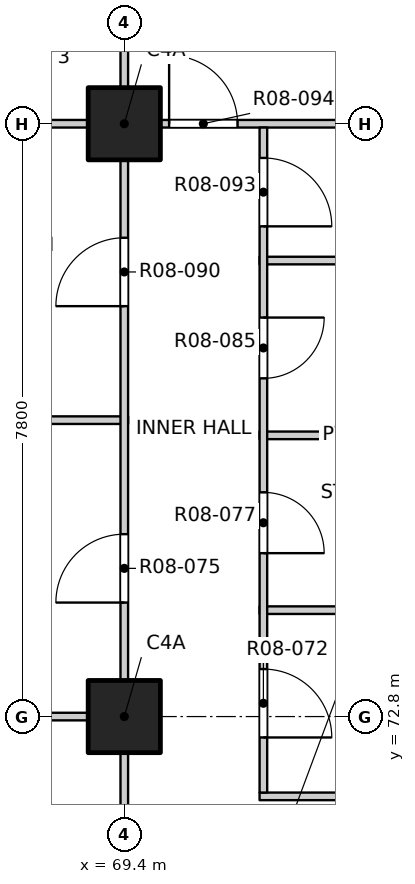
"""IFC4 building model, lengths in metres.
Left out: names, types, materials, properties, quantities, classifications, styles, units other than length and angle.
Written with IfcOpenShell. Run it as: python <this file> out.ifc"""

import sys

from ifc_helpers import new_model, si_unit, direction, frame, frame_2d, origin, origin_2d, place, context, subcontext, project, spatial, rectangle, extrude, element, fill, save


model = new_model("IFC4")
c1 = context("Model", 3, precision=1e-05, world=origin(), true_north=direction((0.0, 1.0)))
c2 = subcontext(c1, "Body", "Model", "MODEL_VIEW")
j1 = project(units=[si_unit("LENGTHUNIT", "METRE"), si_unit("PLANEANGLEUNIT", "RADIAN")], contexts=[c1])
p1 = place(None, origin())
s1 = spatial("IfcSite", under=j1, at=p1, CompositionType="ELEMENT")
p2 = place(p1, origin())
s2 = spatial("IfcBuilding", under=s1, at=p2, CompositionType="ELEMENT")
p3 = place(p2, frame((0.0, 0.0, 103.3)))
s3 = spatial("IfcBuildingStorey", under=s2, at=p3, CompositionType="ELEMENT", Elevation=103.3)
for number, where, z_axis, x_axis in (
    (1, (69.4, 72.8, -0.25), (0.0, 0.0, 1.0), (1.0, 0.0, 0.0)),
    (2, (69.4, 80.6, -0.25), (0.0, 0.0, 1.0), (1.0, 0.0, 0.0)),
):
    element("IfcColumn", number, at=place(p3, frame(where, z_axis=z_axis, x_axis=x_axis)), inside=s3, PredefinedType="COLUMN", context=c2, shape_type="SweptSolid", body=[
        extrude(rectangle(XDim=0.95, YDim=0.95, at=origin_2d()), origin(), (0.0, 0.0, 1.0), 3.4),
    ])
p4 = place(p3, frame((71.18, 71.75, 0.0), z_axis=(0.0, 0.0, 1.0), x_axis=(1.0, 0.0, 0.0)))
e3 = element("IfcWall", 3, at=p4, inside=s3, PredefinedType="PARTITIONING", context=c2, shape_type="SweptSolid", body=[
    extrude(rectangle(XDim=2.22, YDim=0.1, at=frame_2d((1.11, 0.0))), origin(), (0.0, 0.0, 1.0), 3.15),
])
p5 = place(p3, frame((65.8, 72.8, 0.0), z_axis=(0.0, 0.0, 1.0), x_axis=(1.0, 0.0, 0.0)))
e4 = element("IfcWall", 4, at=p5, inside=s3, PredefinedType="PARTITIONING", context=c2, shape_type="SweptSolid", body=[
    extrude(rectangle(XDim=3.65, YDim=0.1, at=frame_2d((1.825, 0.0))), origin(), (0.0, 0.0, 1.0), 3.15),
])
p6 = place(p3, frame((71.18, 74.2, 0.0), z_axis=(0.0, 0.0, 1.0), x_axis=(1.0, 0.0, 0.0)))
e5 = element("IfcWall", 5, at=p6, inside=s3, PredefinedType="PARTITIONING", context=c2, shape_type="SweptSolid", body=[
    extrude(rectangle(XDim=2.22, YDim=0.1, at=frame_2d((1.11, 0.0))), origin(), (0.0, 0.0, 1.0), 3.15),
])
p7 = place(p3, frame((71.18, 76.5, 0.0), z_axis=(0.0, 0.0, 1.0), x_axis=(1.0, 0.0, 0.0)))
e6 = element("IfcWall", 6, at=p7, inside=s3, PredefinedType="PARTITIONING", context=c2, shape_type="SweptSolid", body=[
    extrude(rectangle(XDim=2.22, YDim=0.1, at=frame_2d((1.11, 0.0))), origin(), (0.0, 0.0, 1.0), 2.55),
])
p8 = place(p3, frame((65.8, 76.7, 0.0), z_axis=(0.0, 0.0, 1.0), x_axis=(1.0, 0.0, 0.0)))
e7 = element("IfcWall", 7, at=p8, inside=s3, PredefinedType="PARTITIONING", context=c2, shape_type="SweptSolid", body=[
    extrude(rectangle(XDim=3.65, YDim=0.1, at=frame_2d((1.825, 0.0))), origin(), (0.0, 0.0, 1.0), 2.55),
])
p9 = place(p3, frame((71.18, 78.8, 0.0), z_axis=(0.0, 0.0, 1.0), x_axis=(1.0, 0.0, 0.0)))
e8 = element("IfcWall", 8, at=p9, inside=s3, PredefinedType="PARTITIONING", context=c2, shape_type="SweptSolid", body=[
    extrude(rectangle(XDim=2.22, YDim=0.1, at=frame_2d((1.11, 0.0))), origin(), (0.0, 0.0, 1.0), 3.15),
])
p10 = place(p3, frame((65.8, 80.6, 0.0), z_axis=(0.0, 0.0, 1.0), x_axis=(1.0, 0.0, 0.0)))
e9 = element("IfcWall", 9, at=p10, inside=s3, PredefinedType="PARTITIONING", context=c2, shape_type="SweptSolid", body=[
    extrude(rectangle(XDim=7.6, YDim=0.1, at=frame_2d((3.8, 0.0))), origin(), (0.0, 0.0, 1.0), 3.15),
])
p11 = place(p10, frame((4.19, 0.0, 0.0)))
e10 = element("IfcOpeningElement", 10, at=p11, cuts=e9, PredefinedType="OPENING", context=c2, shape_type="SweptSolid", body=[
    extrude(rectangle(XDim=0.9, YDim=2.1, at=frame_2d((0.45, 1.05))), frame((0.0, 0.06, 0.0), z_axis=(0.0, -1.0, 0.0), x_axis=(1.0, 0.0, 0.0)), (0.0, 0.0, 1.0), 0.12),
])
p12 = place(p3, frame((69.4, 45.8, 0.0), z_axis=(0.0, 0.0, 1.0), x_axis=(0.0, 1.0, 0.0)))
e11 = element("IfcWall", 11, at=p12, inside=s3, PredefinedType="PARTITIONING", context=c2, shape_type="SweptSolid", body=[
    extrude(rectangle(XDim=38.4, YDim=0.1, at=frame_2d((19.2, 0.0))), origin(), (0.0, 0.0, 1.0), 3.15),
])
p13 = place(p12, frame((1.05, 0.0, 0.0)))
e12 = element("IfcOpeningElement", 12, at=p13, cuts=e11, PredefinedType="OPENING", context=c2, shape_type="SweptSolid", body=[
    extrude(rectangle(XDim=1.2, YDim=2.1, at=frame_2d((0.6, 1.05))), frame((0.0, 0.06, 0.0), z_axis=(0.0, -1.0, 0.0), x_axis=(1.0, 0.0, 0.0)), (0.0, 0.0, 1.0), 0.12),
])
p14 = place(p12, frame((5.1, 0.0, 0.0)))
e13 = element("IfcOpeningElement", 13, at=p14, cuts=e11, PredefinedType="OPENING", context=c2, shape_type="SweptSolid", body=[
    extrude(rectangle(XDim=0.9, YDim=2.1, at=frame_2d((0.45, 1.05))), frame((0.0, 0.06, 0.0), z_axis=(0.0, -1.0, 0.0), x_axis=(1.0, 0.0, 0.0)), (0.0, 0.0, 1.0), 0.12),
])
p15 = place(p12, frame((9.0, 0.0, 0.0)))
e14 = element("IfcOpeningElement", 14, at=p15, cuts=e11, PredefinedType="OPENING", context=c2, shape_type="SweptSolid", body=[
    extrude(rectangle(XDim=0.9, YDim=2.1, at=frame_2d((0.45, 1.05))), frame((0.0, 0.06, 0.0), z_axis=(0.0, -1.0, 0.0), x_axis=(1.0, 0.0, 0.0)), (0.0, 0.0, 1.0), 0.12),
])
p16 = place(p12, frame((12.9, 0.0, 0.0)))
e15 = element("IfcOpeningElement", 15, at=p16, cuts=e11, PredefinedType="OPENING", context=c2, shape_type="SweptSolid", body=[
    extrude(rectangle(XDim=0.9, YDim=2.1, at=frame_2d((0.45, 1.05))), frame((0.0, 0.06, 0.0), z_axis=(0.0, -1.0, 0.0), x_axis=(1.0, 0.0, 0.0)), (0.0, 0.0, 1.0), 0.12),
])
p17 = place(p12, frame((16.8, 0.0, 0.0)))
e16 = element("IfcOpeningElement", 16, at=p17, cuts=e11, PredefinedType="OPENING", context=c2, shape_type="SweptSolid", body=[
    extrude(rectangle(XDim=0.9, YDim=2.1, at=frame_2d((0.45, 1.05))), frame((0.0, 0.06, 0.0), z_axis=(0.0, -1.0, 0.0), x_axis=(1.0, 0.0, 0.0)), (0.0, 0.0, 1.0), 0.12),
])
p18 = place(p12, frame((20.7, 0.0, 0.0)))
e17 = element("IfcOpeningElement", 17, at=p18, cuts=e11, PredefinedType="OPENING", context=c2, shape_type="SweptSolid", body=[
    extrude(rectangle(XDim=0.9, YDim=2.1, at=frame_2d((0.45, 1.05))), frame((0.0, 0.06, 0.0), z_axis=(0.0, -1.0, 0.0), x_axis=(1.0, 0.0, 0.0)), (0.0, 0.0, 1.0), 0.12),
])
p19 = place(p12, frame((24.6, 0.0, 0.0)))
e18 = element("IfcOpeningElement", 18, at=p19, cuts=e11, PredefinedType="OPENING", context=c2, shape_type="SweptSolid", body=[
    extrude(rectangle(XDim=0.9, YDim=2.1, at=frame_2d((0.45, 1.05))), frame((0.0, 0.06, 0.0), z_axis=(0.0, -1.0, 0.0), x_axis=(1.0, 0.0, 0.0)), (0.0, 0.0, 1.0), 0.12),
])
p20 = place(p12, frame((28.5, 0.0, 0.0)))
e19 = element("IfcOpeningElement", 19, at=p20, cuts=e11, PredefinedType="OPENING", context=c2, shape_type="SweptSolid", body=[
    extrude(rectangle(XDim=0.9, YDim=2.1, at=frame_2d((0.45, 1.05))), frame((0.0, 0.06, 0.0), z_axis=(0.0, -1.0, 0.0), x_axis=(1.0, 0.0, 0.0)), (0.0, 0.0, 1.0), 0.12),
])
p21 = place(p12, frame((32.4, 0.0, 0.0)))
e20 = element("IfcOpeningElement", 20, at=p21, cuts=e11, PredefinedType="OPENING", context=c2, shape_type="SweptSolid", body=[
    extrude(rectangle(XDim=0.9, YDim=2.1, at=frame_2d((0.45, 1.05))), frame((0.0, 0.06, 0.0), z_axis=(0.0, -1.0, 0.0), x_axis=(1.0, 0.0, 0.0)), (0.0, 0.0, 1.0), 0.12),
])
p22 = place(p12, frame((36.15, 0.0, 0.0)))
e21 = element("IfcOpeningElement", 21, at=p22, cuts=e11, PredefinedType="OPENING", context=c2, shape_type="SweptSolid", body=[
    extrude(rectangle(XDim=1.2, YDim=2.1, at=frame_2d((0.6, 1.05))), frame((0.0, 0.06, 0.0), z_axis=(0.0, -1.0, 0.0), x_axis=(1.0, 0.0, 0.0)), (0.0, 0.0, 1.0), 0.12),
])
p23 = place(p3, frame((71.23, 71.8, 0.0), z_axis=(0.0, 0.0, 1.0), x_axis=(0.0, 1.0, 0.0)))
e22 = element("IfcWall", 22, at=p23, inside=s3, PredefinedType="PARTITIONING", context=c2, shape_type="SweptSolid", body=[
    extrude(rectangle(XDim=8.75, YDim=0.1, at=frame_2d((4.375, 0.0))), origin(), (0.0, 0.0, 1.0), 3.15),
])
p24 = place(p23, frame((0.725, 0.0, 0.0)))
e23 = element("IfcOpeningElement", 23, at=p24, cuts=e22, PredefinedType="OPENING", context=c2, shape_type="SweptSolid", body=[
    extrude(rectangle(XDim=0.9, YDim=2.1, at=frame_2d((0.45, 1.05))), frame((0.0, 0.06, 0.0), z_axis=(0.0, -1.0, 0.0), x_axis=(1.0, 0.0, 0.0)), (0.0, 0.0, 1.0), 0.12),
])
p25 = place(p23, frame((3.15, 0.0, 0.0)))
e24 = element("IfcOpeningElement", 24, at=p25, cuts=e22, PredefinedType="OPENING", context=c2, shape_type="SweptSolid", body=[
    extrude(rectangle(XDim=0.8, YDim=2.1, at=frame_2d((0.4, 1.05))), frame((0.0, 0.06, 0.0), z_axis=(0.0, -1.0, 0.0), x_axis=(1.0, 0.0, 0.0)), (0.0, 0.0, 1.0), 0.12),
])
p26 = place(p23, frame((5.45, 0.0, 0.0)))
e25 = element("IfcOpeningElement", 25, at=p26, cuts=e22, PredefinedType="OPENING", context=c2, shape_type="SweptSolid", body=[
    extrude(rectangle(XDim=0.8, YDim=2.1, at=frame_2d((0.4, 1.05))), frame((0.0, 0.06, 0.0), z_axis=(0.0, -1.0, 0.0), x_axis=(1.0, 0.0, 0.0)), (0.0, 0.0, 1.0), 0.12),
])
p27 = place(p23, frame((7.45, 0.0, 0.0)))
e26 = element("IfcOpeningElement", 26, at=p27, cuts=e22, PredefinedType="OPENING", context=c2, shape_type="SweptSolid", body=[
    extrude(rectangle(XDim=0.9, YDim=2.1, at=frame_2d((0.45, 1.05))), frame((0.0, 0.06, 0.0), z_axis=(0.0, -1.0, 0.0), x_axis=(1.0, 0.0, 0.0)), (0.0, 0.0, 1.0), 0.12),
])
p28 = place(p24, origin())
e27 = element("IfcDoor", 27, at=p28, inside=s3, OperationType="SINGLE_SWING_RIGHT", PredefinedType="DOOR", context=c2, shape_type="SweptSolid", body=[
    extrude(rectangle(XDim=0.9, YDim=2.1, at=frame_2d((0.45, 1.05))), frame((0.0, 0.025, 0.0), z_axis=(0.0, -1.0, 0.0), x_axis=(1.0, 0.0, 0.0)), (0.0, 0.0, 1.0), 0.05),
])
fill(e23, e27)
p29 = place(p20, origin())
e28 = element("IfcDoor", 28, at=p29, inside=s3, OperationType="SINGLE_SWING_LEFT", PredefinedType="DOOR", context=c2, shape_type="SweptSolid", body=[
    extrude(rectangle(XDim=0.9, YDim=2.1, at=frame_2d((0.45, 1.05))), frame((0.0, 0.025, 0.0), z_axis=(0.0, -1.0, 0.0), x_axis=(1.0, 0.0, 0.0)), (0.0, 0.0, 1.0), 0.05),
])
fill(e19, e28)
p30 = place(p25, origin())
e29 = element("IfcDoor", 29, at=p30, inside=s3, OperationType="SINGLE_SWING_RIGHT", PredefinedType="DOOR", context=c2, shape_type="SweptSolid", body=[
    extrude(rectangle(XDim=0.8, YDim=2.1, at=frame_2d((0.4, 1.05))), frame((0.0, 0.025, 0.0), z_axis=(0.0, -1.0, 0.0), x_axis=(1.0, 0.0, 0.0)), (0.0, 0.0, 1.0), 0.05),
])
fill(e24, e29)
p31 = place(p26, origin())
e30 = element("IfcDoor", 30, at=p31, inside=s3, OperationType="SINGLE_SWING_LEFT", PredefinedType="DOOR", context=c2, shape_type="SweptSolid", body=[
    extrude(rectangle(XDim=0.8, YDim=2.1, at=frame_2d((0.4, 1.05))), frame((0.0, 0.025, 0.0), z_axis=(0.0, -1.0, 0.0), x_axis=(1.0, 0.0, 0.0)), (0.0, 0.0, 1.0), 0.05),
])
fill(e25, e30)
p32 = place(p21, origin())
e31 = element("IfcDoor", 31, at=p32, inside=s3, OperationType="SINGLE_SWING_LEFT", PredefinedType="DOOR", context=c2, shape_type="SweptSolid", body=[
    extrude(rectangle(XDim=0.9, YDim=2.1, at=frame_2d((0.45, 1.05))), frame((0.0, 0.025, 0.0), z_axis=(0.0, -1.0, 0.0), x_axis=(1.0, 0.0, 0.0)), (0.0, 0.0, 1.0), 0.05),
])
fill(e20, e31)
p33 = place(p27, origin())
e32 = element("IfcDoor", 32, at=p33, inside=s3, OperationType="SINGLE_SWING_RIGHT", PredefinedType="DOOR", context=c2, shape_type="SweptSolid", body=[
    extrude(rectangle(XDim=0.9, YDim=2.1, at=frame_2d((0.45, 1.05))), frame((0.0, 0.025, 0.0), z_axis=(0.0, -1.0, 0.0), x_axis=(1.0, 0.0, 0.0)), (0.0, 0.0, 1.0), 0.05),
])
fill(e26, e32)
p34 = place(p11, origin())
e33 = element("IfcDoor", 33, at=p34, inside=s3, OperationType="SINGLE_SWING_LEFT", PredefinedType="DOOR", context=c2, shape_type="SweptSolid", body=[
    extrude(rectangle(XDim=0.9, YDim=2.1, at=frame_2d((0.45, 1.05))), frame((0.0, 0.025, 0.0), z_axis=(0.0, -1.0, 0.0), x_axis=(1.0, 0.0, 0.0)), (0.0, 0.0, 1.0), 0.05),
])
fill(e10, e33)
save(model, sys.argv[1])
